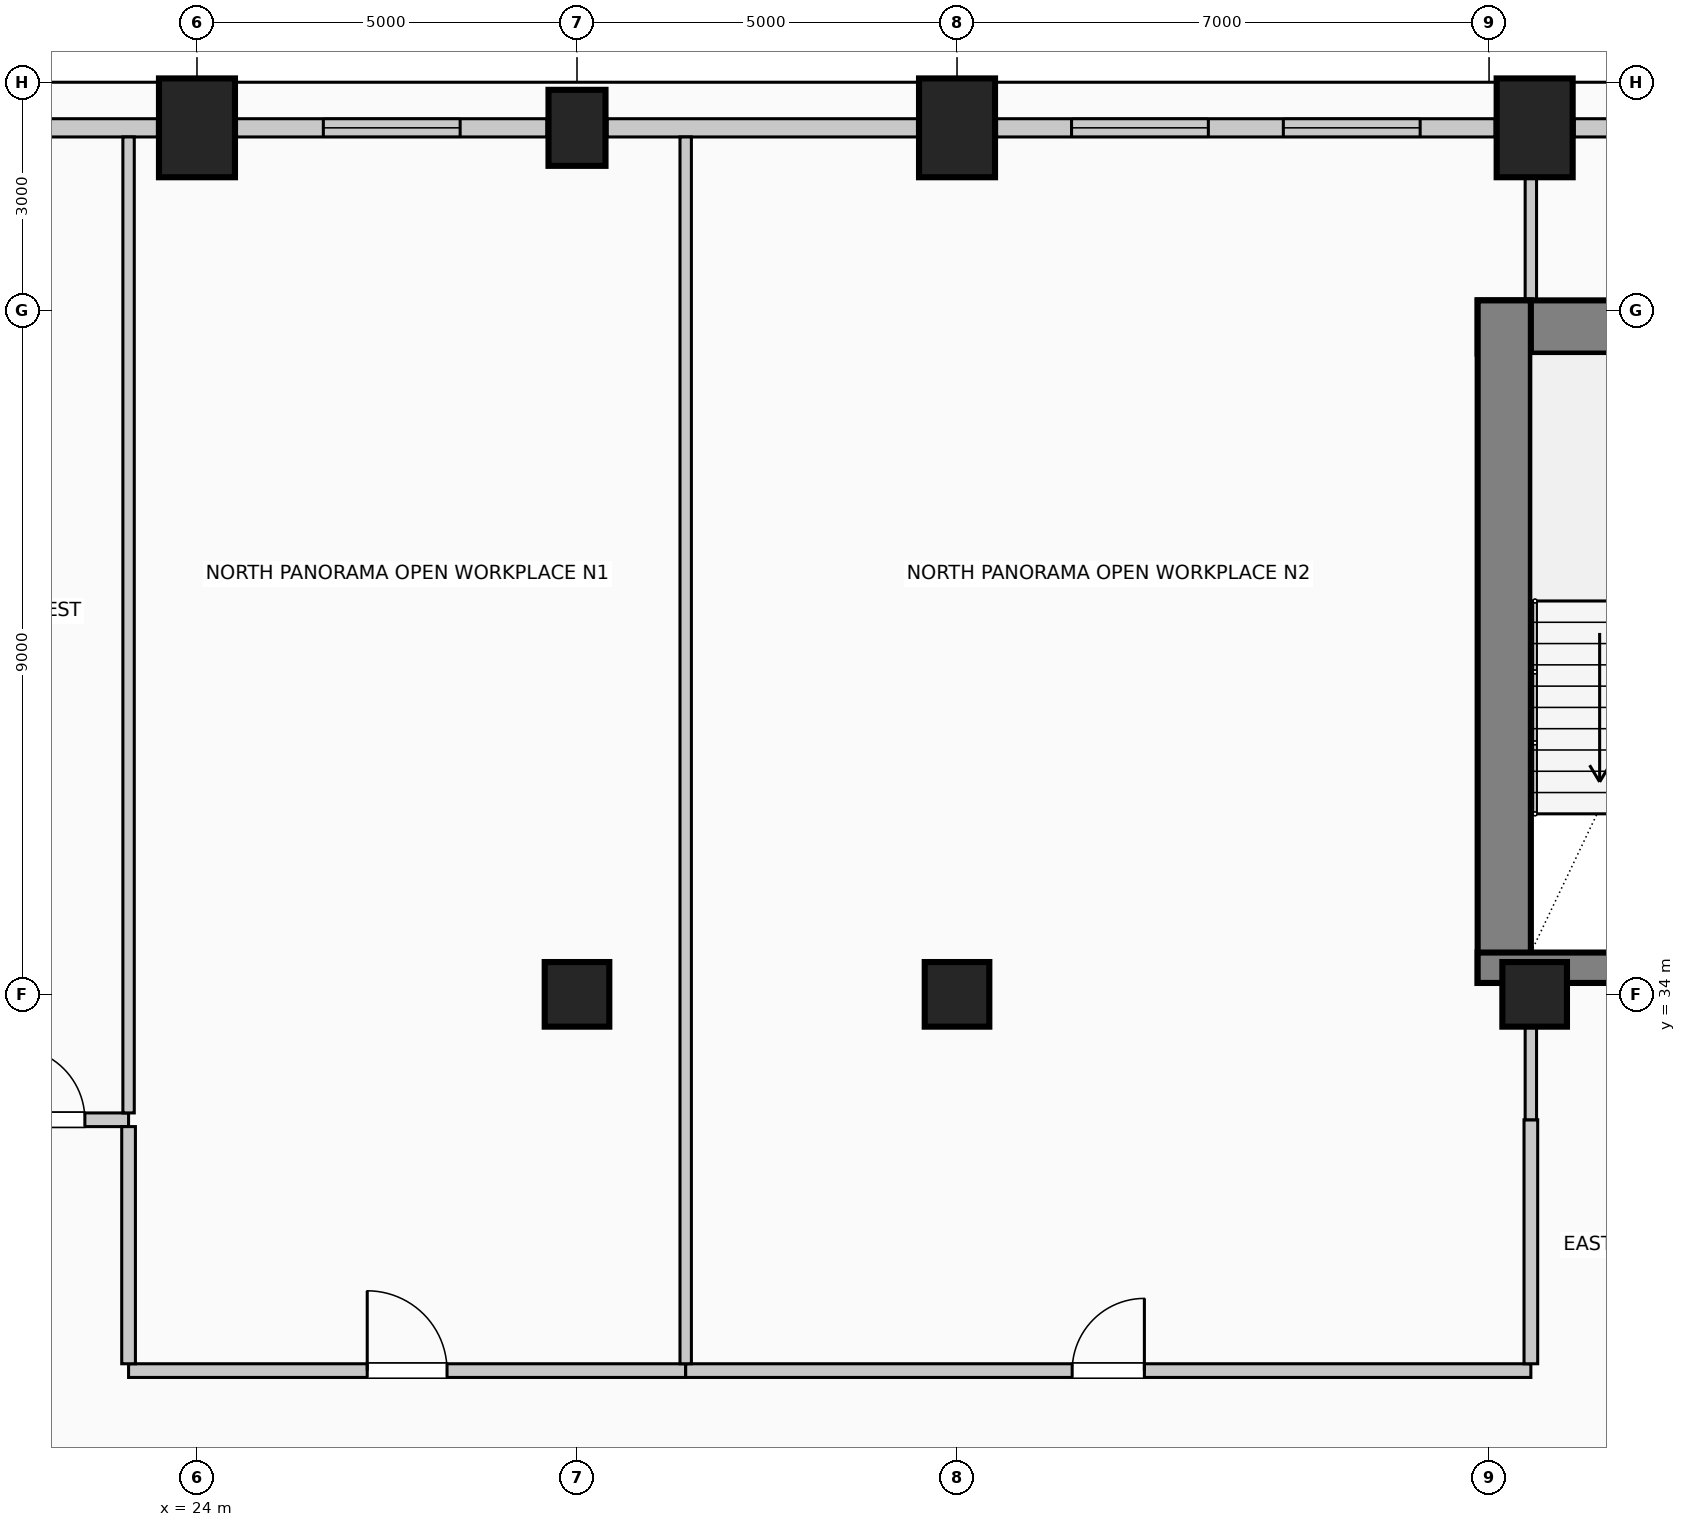
"""IFC4 building model, lengths in metres.
Left out: names, types, materials, properties, quantities, classifications, styles, units other than length and angle.
Written with IfcOpenShell. Run it as: python <this file> out.ifc"""

import sys

from ifc_helpers import new_model, si_unit, direction, frame, frame_2d, origin, origin_2d, place, context, subcontext, project, spatial, rectangle, circle, extrude, element, fill, save


model = new_model("IFC4")
c1 = context("Model", 3, precision=1e-05, world=origin(), true_north=direction((0.0, 1.0)))
c2 = subcontext(c1, "Body", "Model", "MODEL_VIEW")
j1 = project(units=[si_unit("LENGTHUNIT", "METRE"), si_unit("PLANEANGLEUNIT", "RADIAN")], contexts=[c1])
p1 = place(None, origin())
s1 = spatial("IfcSite", under=j1, at=p1, CompositionType="ELEMENT")
p2 = place(p1, origin())
s2 = spatial("IfcBuilding", under=s1, at=p2, CompositionType="ELEMENT")
p3 = place(p2, frame((0.0, 0.0, 256.6)))
s3 = spatial("IfcBuildingStorey", under=s2, at=p3, CompositionType="ELEMENT", Elevation=256.6)
p4 = place(p3, frame((40.85, 42.78, 0.0), z_axis=(0.0, 0.0, 1.0), x_axis=(1.0, 0.0, 0.0)))
e1 = element("IfcWall", 1, at=p4, inside=s3, PredefinedType="SHEAR", context=c2, shape_type="SweptSolid", body=[
    extrude(rectangle(XDim=14.3, YDim=0.7, at=frame_2d((7.15, 0.0))), origin(), (0.0, 0.0, 1.0), 4.0),
])
p5 = place(p3, frame((41.2, 34.15, 0.0), z_axis=(0.0, 0.0, 1.0), x_axis=(0.0, 1.0, 0.0)))
e2 = element("IfcWall", 2, at=p5, inside=s3, PredefinedType="SHEAR", context=c2, shape_type="SweptSolid", body=[
    extrude(rectangle(XDim=8.98, YDim=0.7, at=frame_2d((4.49, 0.0))), origin(), (0.0, 0.0, 1.0), 4.0),
])
p6 = place(p3, frame((40.85, 34.35, 0.0), z_axis=(0.0, 0.0, 1.0), x_axis=(1.0, 0.0, 0.0)))
e3 = element("IfcWall", 3, at=p6, inside=s3, PredefinedType="SHEAR", context=c2, shape_type="SweptSolid", body=[
    extrude(rectangle(XDim=4.86, YDim=0.4, at=frame_2d((2.43, 0.0))), origin(), (0.0, 0.0, 1.0), 4.0),
])
p7 = place(p6, frame((2.4, 0.0, 0.0)))
e4 = element("IfcOpeningElement", 4, at=p7, cuts=e3, PredefinedType="OPENING", context=c2, shape_type="SweptSolid", body=[
    extrude(rectangle(XDim=1.15, YDim=2.2, at=frame_2d((0.575, 1.1))), frame((0.0, 0.21, 0.0), z_axis=(0.0, -1.0, 0.0), x_axis=(1.0, 0.0, 0.0)), (0.0, 0.0, 1.0), 0.42),
])
p8 = place(p3, frame((24.0, 45.4, 0.0), z_axis=(0.0, 0.0, 1.0), x_axis=(1.0, 0.0, 0.0)))
e5 = element("IfcColumn", 5, at=p8, inside=s3, PredefinedType="COLUMN", context=c2, shape_type="SweptSolid", body=[
    extrude(rectangle(XDim=1.0, YDim=1.3, at=origin_2d()), origin(), (0.0, 0.0, 1.0), 4.0),
])
p9 = place(p3, frame((29.0, 45.4, 0.0), z_axis=(0.0, 0.0, 1.0), x_axis=(1.0, 0.0, 0.0)))
e6 = element("IfcColumn", 6, at=p9, inside=s3, PredefinedType="COLUMN", context=c2, shape_type="SweptSolid", body=[
    extrude(rectangle(XDim=0.75, YDim=1.0, at=origin_2d()), origin(), (0.0, 0.0, 1.0), 4.0),
])
for number, where, z_axis, x_axis in (
    (7, (34.0, 45.4, 0.0), (0.0, 0.0, 1.0), (1.0, 0.0, 0.0)),
    (8, (41.6, 45.4, 0.0), (0.0, 0.0, 1.0), (1.0, 0.0, 0.0)),
):
    element("IfcColumn", number, at=place(p3, frame(where, z_axis=z_axis, x_axis=x_axis)), inside=s3, PredefinedType="COLUMN", context=c2, shape_type="SweptSolid", body=[
        extrude(rectangle(XDim=1.0, YDim=1.3, at=origin_2d()), origin(), (0.0, 0.0, 1.0), 4.0),
    ])
for number, where, z_axis, x_axis in (
    (9, (29.0, 34.0, 0.0), (0.0, 0.0, 1.0), (1.0, 0.0, 0.0)),
    (10, (41.6, 34.0, 0.0), (0.0, 0.0, 1.0), (1.0, 0.0, 0.0)),
    (11, (34.0, 34.0, 0.0), (0.0, 0.0, 1.0), (1.0, 0.0, 0.0)),
):
    element("IfcColumn", number, at=place(p3, frame(where, z_axis=z_axis, x_axis=x_axis)), inside=s3, PredefinedType="COLUMN", context=c2, shape_type="SweptSolid", body=[
        extrude(circle(Radius=0.425, at=origin_2d()), origin(), (0.0, 0.0, 1.0), 4.0),
    ])
p10 = place(p3, frame((16.92, 45.4, 0.0), z_axis=(0.0, 0.0, 1.0), x_axis=(1.0, 0.0, 0.0)))
e12 = element("IfcWall", 12, at=p10, inside=s3, PredefinedType="SOLIDWALL", context=c2, shape_type="SweptSolid", body=[
    extrude(rectangle(XDim=6.56, YDim=0.24, at=frame_2d((3.28, 0.0))), origin(), (0.0, 0.0, 1.0), 3.0),
])
p11 = place(p3, frame((24.52, 45.4, 0.0), z_axis=(0.0, 0.0, 1.0), x_axis=(1.0, 0.0, 0.0)))
e13 = element("IfcWall", 13, at=p11, inside=s3, PredefinedType="SOLIDWALL", context=c2, shape_type="SweptSolid", body=[
    extrude(rectangle(XDim=4.085, YDim=0.24, at=frame_2d((2.042, 0.0))), origin(), (0.0, 0.0, 1.0), 3.0),
])
p12 = place(p11, frame((1.143, 0.0, 0.42)))
e14 = element("IfcOpeningElement", 14, at=p12, cuts=e13, PredefinedType="OPENING", context=c2, shape_type="SweptSolid", body=[
    extrude(rectangle(XDim=1.8, YDim=2.2, at=frame_2d((0.9, 1.1))), frame((0.0, 0.13, 0.0), z_axis=(0.0, -1.0, 0.0), x_axis=(1.0, 0.0, 0.0)), (0.0, 0.0, 1.0), 0.26),
])
p13 = place(p3, frame((29.395, 45.4, 0.0), z_axis=(0.0, 0.0, 1.0), x_axis=(1.0, 0.0, 0.0)))
e15 = element("IfcWall", 15, at=p13, inside=s3, PredefinedType="SOLIDWALL", context=c2, shape_type="SweptSolid", body=[
    extrude(rectangle(XDim=4.085, YDim=0.24, at=frame_2d((2.042, 0.0))), origin(), (0.0, 0.0, 1.0), 3.0),
])
p14 = place(p3, frame((34.52, 45.4, 0.0), z_axis=(0.0, 0.0, 1.0), x_axis=(1.0, 0.0, 0.0)))
e16 = element("IfcWall", 16, at=p14, inside=s3, PredefinedType="SOLIDWALL", context=c2, shape_type="SweptSolid", body=[
    extrude(rectangle(XDim=6.56, YDim=0.24, at=frame_2d((3.28, 0.0))), origin(), (0.0, 0.0, 1.0), 3.0),
])
p15 = place(p14, frame((0.987, 0.0, 0.42)))
e17 = element("IfcOpeningElement", 17, at=p15, cuts=e16, PredefinedType="OPENING", context=c2, shape_type="SweptSolid", body=[
    extrude(rectangle(XDim=1.8, YDim=2.2, at=frame_2d((0.9, 1.1))), frame((0.0, 0.13, 0.0), z_axis=(0.0, -1.0, 0.0), x_axis=(1.0, 0.0, 0.0)), (0.0, 0.0, 1.0), 0.26),
])
p16 = place(p14, frame((3.773, 0.0, 0.42)))
e18 = element("IfcOpeningElement", 18, at=p16, cuts=e16, PredefinedType="OPENING", context=c2, shape_type="SweptSolid", body=[
    extrude(rectangle(XDim=1.8, YDim=2.2, at=frame_2d((0.9, 1.1))), frame((0.0, 0.13, 0.0), z_axis=(0.0, -1.0, 0.0), x_axis=(1.0, 0.0, 0.0)), (0.0, 0.0, 1.0), 0.26),
])
p17 = place(p3, frame((42.12, 45.4, 0.0), z_axis=(0.0, 0.0, 1.0), x_axis=(1.0, 0.0, 0.0)))
e19 = element("IfcWall", 19, at=p17, inside=s3, PredefinedType="SOLIDWALL", context=c2, shape_type="SweptSolid", body=[
    extrude(rectangle(XDim=1.485, YDim=0.24, at=frame_2d((0.742, 0.0))), origin(), (0.0, 0.0, 1.0), 3.0),
])
p18 = place(p3, frame((23.1, 29.05, 0.0), z_axis=(0.0, 0.0, 1.0), x_axis=(1.0, 0.0, 0.0)))
e20 = element("IfcWall", 20, at=p18, inside=s3, PredefinedType="PARTITIONING", context=c2, shape_type="SweptSolid", body=[
    extrude(rectangle(XDim=7.33, YDim=0.18, at=frame_2d((3.665, 0.0))), origin(), (0.0, 0.0, 1.0), 3.75),
])
p19 = place(p18, frame((3.14, 0.0, 0.0)))
e21 = element("IfcOpeningElement", 21, at=p19, cuts=e20, PredefinedType="OPENING", context=c2, shape_type="SweptSolid", body=[
    extrude(rectangle(XDim=1.05, YDim=2.15, at=frame_2d((0.525, 1.075))), frame((0.0, 0.1, 0.0), z_axis=(0.0, -1.0, 0.0), x_axis=(1.0, 0.0, 0.0)), (0.0, 0.0, 1.0), 0.2),
])
p20 = place(p3, frame((30.43, 29.05, 0.0), z_axis=(0.0, 0.0, 1.0), x_axis=(1.0, 0.0, 0.0)))
e22 = element("IfcWall", 22, at=p20, inside=s3, PredefinedType="PARTITIONING", context=c2, shape_type="SweptSolid", body=[
    extrude(rectangle(XDim=11.12, YDim=0.18, at=frame_2d((5.56, 0.0))), origin(), (0.0, 0.0, 1.0), 3.75),
])
p21 = place(p20, frame((5.085, 0.0, 0.0)))
e23 = element("IfcOpeningElement", 23, at=p21, cuts=e22, PredefinedType="OPENING", context=c2, shape_type="SweptSolid", body=[
    extrude(rectangle(XDim=0.95, YDim=2.15, at=frame_2d((0.475, 1.075))), frame((0.0, 0.1, 0.0), z_axis=(0.0, -1.0, 0.0), x_axis=(1.0, 0.0, 0.0)), (0.0, 0.0, 1.0), 0.2),
])
p22 = place(p3, frame((21.0, 32.35, 0.0), z_axis=(0.0, 0.0, 1.0), x_axis=(1.0, 0.0, 0.0)))
e24 = element("IfcWall", 24, at=p22, inside=s3, PredefinedType="PARTITIONING", context=c2, shape_type="SweptSolid", body=[
    extrude(rectangle(XDim=2.1, YDim=0.18, at=frame_2d((1.05, 0.0))), origin(), (0.0, 0.0, 1.0), 3.75),
])
p23 = place(p22, frame((0.575, 0.0, 0.0)))
e25 = element("IfcOpeningElement", 25, at=p23, cuts=e24, PredefinedType="OPENING", context=c2, shape_type="SweptSolid", body=[
    extrude(rectangle(XDim=0.95, YDim=2.15, at=frame_2d((0.475, 1.075))), frame((0.0, 0.1, 0.0), z_axis=(0.0, -1.0, 0.0), x_axis=(1.0, 0.0, 0.0)), (0.0, 0.0, 1.0), 0.2),
])
p24 = place(p3, frame((23.1, 29.14, 0.0), z_axis=(0.0, 0.0, 1.0), x_axis=(0.0, 1.0, 0.0)))
e26 = element("IfcWall", 26, at=p24, inside=s3, PredefinedType="PARTITIONING", context=c2, shape_type="SweptSolid", body=[
    extrude(rectangle(XDim=3.12, YDim=0.18, at=frame_2d((1.56, 0.0))), origin(), (0.0, 0.0, 1.0), 3.75),
])
p25 = place(p3, frame((23.1, 32.44, 0.0), z_axis=(0.0, 0.0, 1.0), x_axis=(0.0, 1.0, 0.0)))
e27 = element("IfcWall", 27, at=p25, inside=s3, PredefinedType="PARTITIONING", context=c2, shape_type="SweptSolid", body=[
    extrude(rectangle(XDim=12.84, YDim=0.15, at=frame_2d((6.42, 0.0))), origin(), (0.0, 0.0, 1.0), 3.75),
])
p26 = place(p3, frame((30.43, 29.14, 0.0), z_axis=(0.0, 0.0, 1.0), x_axis=(0.0, 1.0, 0.0)))
e28 = element("IfcWall", 28, at=p26, inside=s3, PredefinedType="PARTITIONING", context=c2, shape_type="SweptSolid", body=[
    extrude(rectangle(XDim=16.14, YDim=0.15, at=frame_2d((8.07, 0.0))), origin(), (0.0, 0.0, 1.0), 3.75),
])
p27 = place(p3, frame((41.55, 29.14, 0.0), z_axis=(0.0, 0.0, 1.0), x_axis=(0.0, 1.0, 0.0)))
e29 = element("IfcWall", 29, at=p27, inside=s3, PredefinedType="PARTITIONING", context=c2, shape_type="SweptSolid", body=[
    extrude(rectangle(XDim=3.21, YDim=0.18, at=frame_2d((1.605, 0.0))), origin(), (0.0, 0.0, 1.0), 3.195),
])
p28 = place(p3, frame((41.55, 32.35, 0.0), z_axis=(0.0, 0.0, 1.0), x_axis=(0.0, 1.0, 0.0)))
e30 = element("IfcWall", 30, at=p28, inside=s3, PredefinedType="PARTITIONING", context=c2, shape_type="SweptSolid", body=[
    extrude(rectangle(XDim=1.225, YDim=0.15, at=frame_2d((0.612, 0.0))), origin(), (0.0, 0.0, 1.0), 3.195),
])
p29 = place(p3, frame((41.55, 43.13, 0.0), z_axis=(0.0, 0.0, 1.0), x_axis=(0.0, 1.0, 0.0)))
e31 = element("IfcWall", 31, at=p29, inside=s3, PredefinedType="PARTITIONING", context=c2, shape_type="SweptSolid", body=[
    extrude(rectangle(XDim=1.62, YDim=0.15, at=frame_2d((0.81, 0.0))), origin(), (0.0, 0.0, 1.0), 3.75),
])
p30 = place(p12, origin())
e32 = element("IfcWindow", 32, at=p30, inside=s3, PartitioningType="SINGLE_PANEL", PredefinedType="WINDOW", context=c2, shape_type="SweptSolid", body=[
    extrude(rectangle(XDim=1.8, YDim=2.2, at=frame_2d((0.9, 1.1))), frame((0.0, 0.03, 0.0), z_axis=(0.0, -1.0, 0.0), x_axis=(1.0, 0.0, 0.0)), (0.0, 0.0, 1.0), 0.06),
])
fill(e14, e32)
p31 = place(p15, origin())
e33 = element("IfcWindow", 33, at=p31, inside=s3, PartitioningType="SINGLE_PANEL", PredefinedType="WINDOW", context=c2, shape_type="SweptSolid", body=[
    extrude(rectangle(XDim=1.8, YDim=2.2, at=frame_2d((0.9, 1.1))), frame((0.0, 0.03, 0.0), z_axis=(0.0, -1.0, 0.0), x_axis=(1.0, 0.0, 0.0)), (0.0, 0.0, 1.0), 0.06),
])
fill(e17, e33)
p32 = place(p16, origin())
e34 = element("IfcWindow", 34, at=p32, inside=s3, PartitioningType="SINGLE_PANEL", PredefinedType="WINDOW", context=c2, shape_type="SweptSolid", body=[
    extrude(rectangle(XDim=1.8, YDim=2.2, at=frame_2d((0.9, 1.1))), frame((0.0, 0.03, 0.0), z_axis=(0.0, -1.0, 0.0), x_axis=(1.0, 0.0, 0.0)), (0.0, 0.0, 1.0), 0.06),
])
fill(e18, e34)
p33 = place(p19, origin())
e35 = element("IfcDoor", 35, at=p33, inside=s3, OperationType="SINGLE_SWING_LEFT", PredefinedType="DOOR", context=c2, shape_type="SweptSolid", body=[
    extrude(rectangle(XDim=1.05, YDim=2.15, at=frame_2d((0.525, 1.075))), frame((0.0, 0.025, 0.0), z_axis=(0.0, -1.0, 0.0), x_axis=(1.0, 0.0, 0.0)), (0.0, 0.0, 1.0), 0.05),
])
fill(e21, e35)
p34 = place(p21, origin())
e36 = element("IfcDoor", 36, at=p34, inside=s3, OperationType="SINGLE_SWING_RIGHT", PredefinedType="DOOR", context=c2, shape_type="SweptSolid", body=[
    extrude(rectangle(XDim=0.95, YDim=2.15, at=frame_2d((0.475, 1.075))), frame((0.0, 0.025, 0.0), z_axis=(0.0, -1.0, 0.0), x_axis=(1.0, 0.0, 0.0)), (0.0, 0.0, 1.0), 0.05),
])
fill(e23, e36)
p35 = place(p23, origin())
e37 = element("IfcDoor", 37, at=p35, inside=s3, OperationType="SINGLE_SWING_LEFT", PredefinedType="DOOR", context=c2, shape_type="SweptSolid", body=[
    extrude(rectangle(XDim=0.95, YDim=2.15, at=frame_2d((0.475, 1.075))), frame((0.0, 0.025, 0.0), z_axis=(0.0, -1.0, 0.0), x_axis=(1.0, 0.0, 0.0)), (0.0, 0.0, 1.0), 0.05),
])
fill(e25, e37)
save(model, sys.argv[1])
